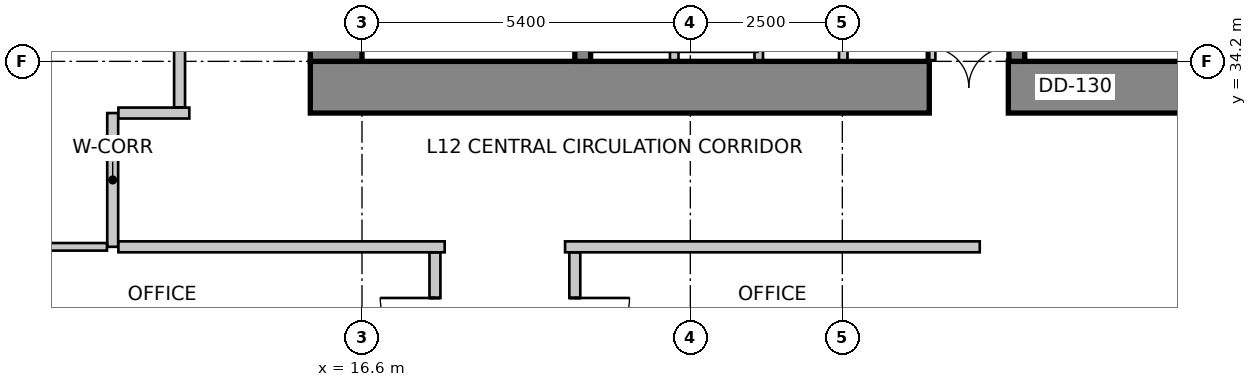
"""IFC4 building model, lengths in metres.
Left out: names, types, materials, properties, quantities, classifications, styles, units other than length and angle.
Written with IfcOpenShell. Run it as: python <this file> out.ifc"""

import sys

from ifc_helpers import new_model, si_unit, direction, frame, frame_2d, origin, place, context, subcontext, project, spatial, rectangle, extrude, source, transform, mapped, element, fill, save


model = new_model("IFC4")
c1 = context("Model", 3, precision=1e-05, world=origin(), true_north=direction((0.0, 1.0)))
c2 = subcontext(c1, "Body", "Model", "MODEL_VIEW")
j1 = project(units=[si_unit("LENGTHUNIT", "METRE"), si_unit("PLANEANGLEUNIT", "RADIAN")], contexts=[c1])
p1 = place(None, origin())
s1 = spatial("IfcSite", under=j1, at=p1, CompositionType="ELEMENT")
p2 = place(p1, origin())
s2 = spatial("IfcBuilding", under=s1, at=p2, CompositionType="ELEMENT")
p3 = place(p2, frame((0.0, 0.0, 51.0)))
s3 = spatial("IfcBuildingStorey", under=s2, at=p3, CompositionType="ELEMENT", Elevation=51.0)
p4 = place(p3, frame((15.75, 33.775, 0.0), z_axis=(0.0, 0.0, 1.0), x_axis=(1.0, 0.0, 0.0)))
e1 = element("IfcWall", 1, at=p4, inside=s3, PredefinedType="SHEAR", context=c2, shape_type="SweptSolid", body=[
    extrude(rectangle(XDim=16.1, YDim=0.85, at=frame_2d((8.05, 0.0))), origin(), (0.0, 0.0, 1.0), 4.0),
])
m1 = source(origin(), c2, "Body", "SweptSolid", [
    extrude(rectangle(XDim=1.3, YDim=2.15, at=frame_2d((0.65, 1.075))), frame((0.0, 0.435, 0.0), z_axis=(0.0, -1.0, 0.0), x_axis=(1.0, 0.0, 0.0)), (0.0, 0.0, 1.0), 0.87),
])
p5 = place(p4, frame((10.18, 0.0, 0.0)))
e2 = element("IfcOpeningElement", 2, at=p5, cuts=e1, PredefinedType="OPENING", context=c2, shape_type="MappedRepresentation", body=[
    mapped(m1, transform((0.0, 0.0, 0.0), scale=1.0)),
])
p6 = place(p3, frame((16.175, 34.2, 0.0), z_axis=(0.0, 0.0, 1.0), x_axis=(0.0, 1.0, 0.0)))
e3 = element("IfcWall", 3, at=p6, inside=s3, PredefinedType="SHEAR", context=c2, shape_type="SweptSolid", body=[
    extrude(rectangle(XDim=11.4, YDim=0.85, at=frame_2d((5.7, 0.0))), origin(), (0.0, 0.0, 1.0), 4.0),
])
m2 = source(origin(), c2, "Body", "SweptSolid", [
    extrude(rectangle(XDim=1.1, YDim=2.15, at=frame_2d((0.55, 1.075))), frame((0.0, 0.435, 0.0), z_axis=(0.0, -1.0, 0.0), x_axis=(1.0, 0.0, 0.0)), (0.0, 0.0, 1.0), 0.87),
])
p7 = place(p6, frame((7.15, 0.0, 0.0)))
e4 = element("IfcOpeningElement", 4, at=p7, cuts=e3, PredefinedType="OPENING", context=c2, shape_type="MappedRepresentation", body=[
    mapped(m2, transform((0.0, 0.0, 0.0), scale=1.0)),
])
p8 = place(p3, frame((20.23, 34.2, 0.0), z_axis=(0.0, 0.0, 1.0), x_axis=(0.0, 1.0, 0.0)))
e5 = element("IfcWall", 5, at=p8, inside=s3, PredefinedType="SHEAR", context=c2, shape_type="SweptSolid", body=[
    extrude(rectangle(XDim=9.06, YDim=0.26, at=frame_2d((4.53, 0.0))), origin(), (0.0, 0.0, 1.0), 4.0),
])
m3 = source(origin(), c2, "Body", "SweptSolid", [
    extrude(rectangle(XDim=1.1, YDim=2.15, at=frame_2d((0.55, 1.075))), frame((0.0, 0.14, 0.0), z_axis=(0.0, -1.0, 0.0), x_axis=(1.0, 0.0, 0.0)), (0.0, 0.0, 1.0), 0.28),
])
p9 = place(p8, frame((7.45, 0.0, 0.0)))
e6 = element("IfcOpeningElement", 6, at=p9, cuts=e5, PredefinedType="OPENING", context=c2, shape_type="MappedRepresentation", body=[
    mapped(m3, transform((0.0, 0.0, 0.0), scale=1.0)),
])
p10 = place(p3, frame((27.37, 34.2, 0.0), z_axis=(0.0, 0.0, 1.0), x_axis=(0.0, 1.0, 0.0)))
e7 = element("IfcWall", 7, at=p10, inside=s3, PredefinedType="SHEAR", context=c2, shape_type="SweptSolid", body=[
    extrude(rectangle(XDim=9.06, YDim=0.26, at=frame_2d((4.53, 0.0))), origin(), (0.0, 0.0, 1.0), 4.0),
])
p11 = place(p10, frame((7.45, 0.0, 0.0)))
e8 = element("IfcOpeningElement", 8, at=p11, cuts=e7, PredefinedType="OPENING", context=c2, shape_type="MappedRepresentation", body=[
    mapped(m3, transform((0.0, 0.0, 0.0), scale=1.0)),
])
p12 = place(p3, frame((13.269, 47.134, 0.0), z_axis=(0.0, 0.0, 1.0), x_axis=(-0.319920423265, -0.947444416722, 0.0)))
e9 = element("IfcWall", 9, at=p12, inside=s3, PredefinedType="SOLIDWALL", context=c2, shape_type="SweptSolid", body=[
    extrude(rectangle(XDim=16.135, YDim=0.3, at=frame_2d((8.067, 0.0))), origin(), (0.0, 0.0, 1.0), 3.75),
])
m4 = source(origin(), c2, "Body", "SweptSolid", [
    extrude(rectangle(XDim=2.8, YDim=2.4, at=frame_2d((1.4, 1.2))), frame((0.0, 0.16, 0.0), z_axis=(0.0, -1.0, 0.0), x_axis=(1.0, 0.0, 0.0)), (0.0, 0.0, 1.0), 0.32),
])
p13 = place(p12, frame((1.988, 0.0, 0.85)))
e10 = element("IfcOpeningElement", 10, at=p13, cuts=e9, PredefinedType="OPENING", context=c2, shape_type="MappedRepresentation", body=[
    mapped(m4, transform((0.0, 0.0, 0.0), scale=1.0)),
])
m5 = source(origin(), c2, "Body", "SweptSolid", [
    extrude(rectangle(XDim=2.4, YDim=2.2, at=frame_2d((1.2, 1.1))), frame((0.0, 0.16, 0.0), z_axis=(0.0, -1.0, 0.0), x_axis=(1.0, 0.0, 0.0)), (0.0, 0.0, 1.0), 0.32),
])
p14 = place(p12, frame((7.159, 0.0, 0.85)))
e11 = element("IfcOpeningElement", 11, at=p14, cuts=e9, PredefinedType="OPENING", context=c2, shape_type="MappedRepresentation", body=[
    mapped(m5, transform((0.0, 0.0, 0.0), scale=1.0)),
])
p15 = place(p12, frame((11.93, 0.0, 0.85)))
e12 = element("IfcOpeningElement", 12, at=p15, cuts=e9, PredefinedType="OPENING", context=c2, shape_type="MappedRepresentation", body=[
    mapped(m4, transform((0.0, 0.0, 0.0), scale=1.0)),
])
p16 = place(p3, frame((8.183, 31.833, 0.0), z_axis=(0.0, 0.0, 1.0), x_axis=(0.18216364648, -0.983268226834, 0.0)))
e13 = element("IfcWall", 13, at=p16, inside=s3, PredefinedType="SOLIDWALL", context=c2, shape_type="SweptSolid", body=[
    extrude(rectangle(XDim=26.678, YDim=0.3, at=frame_2d((13.339, 0.0))), origin(), (0.0, 0.0, 1.0), 3.75),
])
m6 = source(origin(), c2, "Body", "SweptSolid", [
    extrude(rectangle(XDim=1.8, YDim=2.1, at=frame_2d((0.9, 1.05))), frame((0.0, 0.16, 0.0), z_axis=(0.0, -1.0, 0.0), x_axis=(1.0, 0.0, 0.0)), (0.0, 0.0, 1.0), 0.32),
])
p17 = place(p16, frame((1.164, 0.0, 0.85)))
e14 = element("IfcOpeningElement", 14, at=p17, cuts=e13, PredefinedType="OPENING", context=c2, shape_type="MappedRepresentation", body=[
    mapped(m6, transform((0.0, 0.0, 0.0), scale=1.0)),
])
p18 = place(p16, frame((4.5, 0.0, 0.85)))
e15 = element("IfcOpeningElement", 15, at=p18, cuts=e13, PredefinedType="OPENING", context=c2, shape_type="MappedRepresentation", body=[
    mapped(m5, transform((0.0, 0.0, 0.0), scale=1.0)),
])
p19 = place(p16, frame((9.076, 0.0, 0.85)))
e16 = element("IfcOpeningElement", 16, at=p19, cuts=e13, PredefinedType="OPENING", context=c2, shape_type="MappedRepresentation", body=[
    mapped(m5, transform((0.0, 0.0, 0.0), scale=1.0)),
])
p20 = place(p16, frame((13.653, 0.0, 0.85)))
e17 = element("IfcOpeningElement", 17, at=p20, cuts=e13, PredefinedType="OPENING", context=c2, shape_type="MappedRepresentation", body=[
    mapped(m5, transform((0.0, 0.0, 0.0), scale=1.0)),
])
p21 = place(p16, frame((18.411, 0.0, 0.85)))
e18 = element("IfcOpeningElement", 18, at=p21, cuts=e13, PredefinedType="OPENING", context=c2, shape_type="MappedRepresentation", body=[
    mapped(m5, transform((0.0, 0.0, 0.0), scale=1.0)),
])
p22 = place(p16, frame((22.709, 0.0, 0.85)))
e19 = element("IfcOpeningElement", 19, at=p22, cuts=e13, PredefinedType="OPENING", context=c2, shape_type="MappedRepresentation", body=[
    mapped(m4, transform((0.0, 0.0, 0.0), scale=1.0)),
])
for number, where, z_axis, x_axis in (
    (20, (25.96, 34.22, 0.0), (0.0, 0.0, 1.0), (0.0, 1.0, 0.0)),
    (21, (21.735, 34.22, 0.0), (0.0, 0.0, 1.0), (0.0, 1.0, 0.0)),
    (22, (23.125, 34.22, 0.0), (0.0, 0.0, 1.0), (0.0, 1.0, 0.0)),
    (23, (24.515, 34.22, 0.0), (0.0, 0.0, 1.0), (0.0, 1.0, 0.0)),
):
    element("IfcWall", number, at=place(p3, frame(where, z_axis=z_axis, x_axis=x_axis)), inside=s3, PredefinedType="SOLIDWALL", context=c2, shape_type="SweptSolid", body=[
        extrude(rectangle(XDim=1.62, YDim=0.14, at=frame_2d((0.81, 0.0))), origin(), (0.0, 0.0, 1.0), 3.042),
    ])
p23 = place(p3, frame((12.5, 31.15, 0.0), z_axis=(0.0, 0.0, 1.0), x_axis=(0.0, 1.0, 0.0)))
e24 = element("IfcWall", 24, at=p23, inside=s3, PredefinedType="PARTITIONING", context=c2, shape_type="SweptSolid", body=[
    extrude(rectangle(XDim=2.2, YDim=0.18, at=frame_2d((1.1, 0.0))), origin(), (0.0, 0.0, 1.0), 3.335),
])
p24 = place(p3, frame((12.594, 33.35, 0.0), z_axis=(0.0, 0.0, 1.0), x_axis=(1.0, 0.0, 0.0)))
e25 = element("IfcWall", 25, at=p24, inside=s3, PredefinedType="PARTITIONING", context=c2, shape_type="SweptSolid", body=[
    extrude(rectangle(XDim=1.166, YDim=0.18, at=frame_2d((0.583, 0.0))), origin(), (0.0, 0.0, 1.0), 3.75),
])
p25 = place(p3, frame((17.96, 31.15, 0.0), z_axis=(0.0, 0.0, 1.0), x_axis=(-1.0, 0.0, 0.0)))
e26 = element("IfcWall", 26, at=p25, inside=s3, PredefinedType="PARTITIONING", context=c2, shape_type="SweptSolid", body=[
    extrude(rectangle(XDim=5.366, YDim=0.18, at=frame_2d((2.683, 0.0))), origin(), (0.0, 0.0, 1.0), 3.335),
])
p26 = place(p3, frame((26.76, 31.15, 0.0), z_axis=(0.0, 0.0, 1.0), x_axis=(-1.0, 0.0, 0.0)))
e27 = element("IfcWall", 27, at=p26, inside=s3, PredefinedType="PARTITIONING", context=c2, shape_type="SweptSolid", body=[
    extrude(rectangle(XDim=6.82, YDim=0.18, at=frame_2d((3.41, 0.0))), origin(), (0.0, 0.0, 1.0), 3.335),
])
p27 = place(p3, frame((13.6, 33.444, 0.0), z_axis=(0.0, 0.0, 1.0), x_axis=(0.0, 1.0, 0.0)))
e28 = element("IfcWall", 28, at=p27, inside=s3, PredefinedType="PARTITIONING", context=c2, shape_type="SweptSolid", body=[
    extrude(rectangle(XDim=13.896, YDim=0.18, at=frame_2d((6.948, 0.0))), origin(), (0.0, 0.0, 1.0), 2.892),
])
m7 = source(origin(), c2, "Body", "SweptSolid", [
    extrude(rectangle(XDim=0.9, YDim=2.15, at=frame_2d((0.45, 1.075))), frame((0.0, 0.1, 0.0), z_axis=(0.0, -1.0, 0.0), x_axis=(1.0, 0.0, 0.0)), (0.0, 0.0, 1.0), 0.2),
])
p28 = place(p27, frame((4.144, 0.0, 0.0)))
e29 = element("IfcOpeningElement", 29, at=p28, cuts=e28, PredefinedType="OPENING", context=c2, shape_type="MappedRepresentation", body=[
    mapped(m7, transform((0.0, 0.0, 0.0), scale=1.0)),
])
p29 = place(p3, frame((12.406, 31.15, 0.0), z_axis=(0.0, 0.0, 1.0), x_axis=(-1.0, 0.0, 0.0)))
e30 = element("IfcWall", 30, at=p29, inside=s3, PredefinedType="PARTITIONING", context=c2, shape_type="SweptSolid", body=[
    extrude(rectangle(XDim=3.979, YDim=0.125, at=frame_2d((1.99, 0.0))), origin(), (0.0, 0.0, 1.0), 2.892),
])
p30 = place(p3, frame((17.8, 28.662, 0.0), z_axis=(0.0, 0.0, 1.0), x_axis=(0.0, 1.0, 0.0)))
e31 = element("IfcWall", 31, at=p30, inside=s3, PredefinedType="PARTITIONING", context=c2, shape_type="SweptSolid", body=[
    extrude(rectangle(XDim=2.394, YDim=0.18, at=frame_2d((1.197, 0.0))), origin(), (0.0, 0.0, 1.0), 3.335),
])
p31 = place(p30, frame((0.747, 0.0, 0.0)))
e32 = element("IfcOpeningElement", 32, at=p31, cuts=e31, PredefinedType="OPENING", context=c2, shape_type="MappedRepresentation", body=[
    mapped(m7, transform((0.0, 0.0, 0.0), scale=1.0)),
])
p32 = place(p3, frame((20.1, 31.056, 0.0), z_axis=(0.0, 0.0, 1.0), x_axis=(0.0, -1.0, 0.0)))
e33 = element("IfcWall", 33, at=p32, inside=s3, PredefinedType="PARTITIONING", context=c2, shape_type="SweptSolid", body=[
    extrude(rectangle(XDim=2.394, YDim=0.18, at=frame_2d((1.197, 0.0))), origin(), (0.0, 0.0, 1.0), 3.335),
])
p33 = place(p32, frame((0.747, 0.0, 0.0)))
e34 = element("IfcOpeningElement", 34, at=p33, cuts=e33, PredefinedType="OPENING", context=c2, shape_type="MappedRepresentation", body=[
    mapped(m7, transform((0.0, 0.0, 0.0), scale=1.0)),
])
m8 = source(origin(), c2, "Body", "SweptSolid", [
    extrude(rectangle(XDim=1.3, YDim=2.15, at=frame_2d((0.65, 1.075))), frame((0.0, 0.025, 0.0), z_axis=(0.0, -1.0, 0.0), x_axis=(1.0, 0.0, 0.0)), (0.0, 0.0, 1.0), 0.05),
])
p34 = place(p5, origin())
e35 = element("IfcDoor", 35, at=p34, inside=s3, OperationType="DOUBLE_DOOR_SINGLE_SWING", PredefinedType="DOOR", context=c2, shape_type="MappedRepresentation", body=[
    mapped(m8, transform((0.0, 0.0, 0.0), scale=1.0)),
])
fill(e2, e35)
m9 = source(origin(), c2, "Body", "SweptSolid", [
    extrude(rectangle(XDim=0.9, YDim=2.15, at=frame_2d((0.45, 1.075))), frame((0.0, 0.025, 0.0), z_axis=(0.0, -1.0, 0.0), x_axis=(1.0, 0.0, 0.0)), (0.0, 0.0, 1.0), 0.05),
])
p35 = place(p31, origin())
e36 = element("IfcDoor", 36, at=p35, inside=s3, OperationType="SINGLE_SWING_RIGHT", PredefinedType="DOOR", context=c2, shape_type="MappedRepresentation", body=[
    mapped(m9, transform((0.0, 0.0, 0.0), scale=1.0)),
])
fill(e32, e36)
p36 = place(p33, origin())
e37 = element("IfcDoor", 37, at=p36, inside=s3, OperationType="SINGLE_SWING_LEFT", PredefinedType="DOOR", context=c2, shape_type="MappedRepresentation", body=[
    mapped(m9, transform((0.0, 0.0, 0.0), scale=1.0)),
])
fill(e34, e37)
save(model, sys.argv[1])
